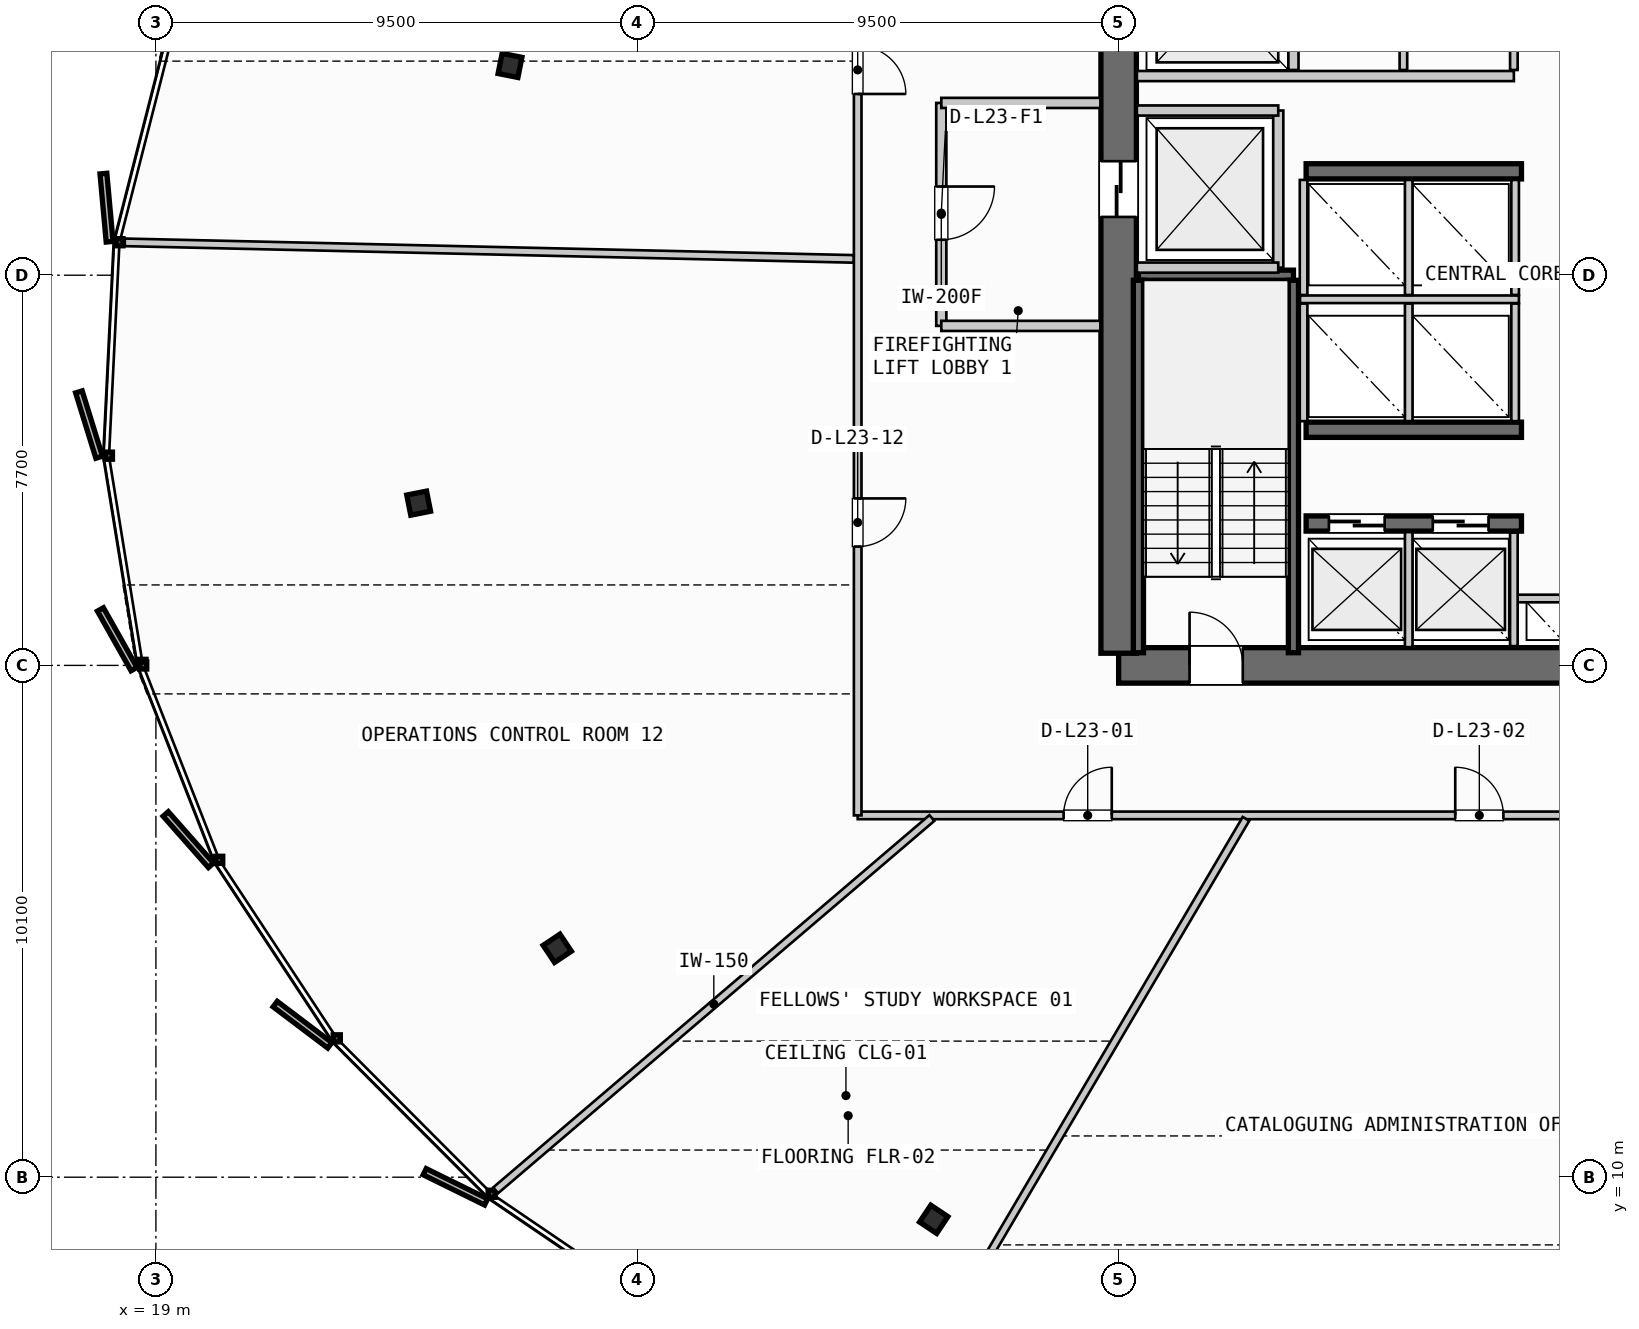
"""IFC4 building model, lengths in metres.
Left out: names, types, materials, properties, quantities, classifications, styles, units other than length and angle.
Written with IfcOpenShell. Run it as: python <this file> out.ifc"""

import sys

from ifc_helpers import new_model, si_unit, direction, frame, frame_2d, origin, origin_2d, place, context, subcontext, project, spatial, rectangle, i_section, extrude, source, transform, mapped, element, fill, save


model = new_model("IFC4")
c1 = context("Model", 3, precision=1e-05, world=origin(), true_north=direction((0.0, 1.0)))
c2 = subcontext(c1, "Body", "Model", "MODEL_VIEW")
j1 = project(units=[si_unit("LENGTHUNIT", "METRE"), si_unit("PLANEANGLEUNIT", "RADIAN")], contexts=[c1])
p1 = place(None, origin())
s1 = spatial("IfcSite", under=j1, at=p1, CompositionType="ELEMENT")
p2 = place(p1, origin())
s2 = spatial("IfcBuilding", under=s1, at=p2, CompositionType="ELEMENT")
p3 = place(p2, frame((0.0, 0.0, 96.4)))
s3 = spatial("IfcBuildingStorey", under=s2, at=p3, CompositionType="ELEMENT", Elevation=96.4)
p4 = place(p3, frame((38.0, 20.1, 0.0), z_axis=(0.0, 0.0, 1.0), x_axis=(1.0, 0.0, 0.0)))
e1 = element("IfcWall", 1, at=p4, inside=s3, PredefinedType="SHEAR", context=c2, shape_type="SweptSolid", body=[
    extrude(rectangle(XDim=17.6, YDim=0.7, at=frame_2d((8.8, 0.0))), origin(), (0.0, 0.0, 1.0), 3.35),
])
p5 = place(p4, frame((1.4, 0.0, 0.0)))
e2 = element("IfcOpeningElement", 2, at=p5, cuts=e1, PredefinedType="OPENING", context=c2, shape_type="SweptSolid", body=[
    extrude(rectangle(XDim=1.05, YDim=2.15, at=frame_2d((0.525, 1.075))), frame((0.0, 0.36, 0.0), z_axis=(0.0, -1.0, 0.0), x_axis=(1.0, 0.0, 0.0)), (0.0, 0.0, 1.0), 0.72),
])
p6 = place(p4, frame((15.15, 0.0, 0.0)))
e3 = element("IfcOpeningElement", 3, at=p6, cuts=e1, PredefinedType="OPENING", context=c2, shape_type="SweptSolid", body=[
    extrude(rectangle(XDim=1.05, YDim=2.15, at=frame_2d((0.525, 1.075))), frame((0.0, 0.36, 0.0), z_axis=(0.0, -1.0, 0.0), x_axis=(1.0, 0.0, 0.0)), (0.0, 0.0, 1.0), 0.72),
])
p7 = place(p3, frame((38.0, 35.26, 0.0), z_axis=(0.0, 0.0, 1.0), x_axis=(0.0, -1.0, 0.0)))
e4 = element("IfcWall", 4, at=p7, inside=s3, PredefinedType="SHEAR", context=c2, shape_type="SweptSolid", body=[
    extrude(rectangle(XDim=14.92, YDim=0.7, at=frame_2d((7.46, 0.0))), origin(), (0.0, 0.0, 1.0), 3.35),
])
p8 = place(p7, frame((5.21, 0.0, 0.0)))
e5 = element("IfcOpeningElement", 5, at=p8, cuts=e4, PredefinedType="OPENING", context=c2, shape_type="SweptSolid", body=[
    extrude(rectangle(XDim=1.1, YDim=2.2, at=frame_2d((0.55, 1.1))), frame((0.0, 0.36, 0.0), z_axis=(0.0, -1.0, 0.0), x_axis=(1.0, 0.0, 0.0)), (0.0, 0.0, 1.0), 0.72),
])
p9 = place(p3, frame((41.7, 22.9, 0.0), z_axis=(0.0, 0.0, 1.0), x_axis=(1.0, 0.0, 0.0)))
e6 = element("IfcWall", 6, at=p9, inside=s3, PredefinedType="SHEAR", context=c2, shape_type="SweptSolid", body=[
    extrude(rectangle(XDim=4.25, YDim=0.3, at=frame_2d((2.125, 0.0))), origin(), (0.0, 0.0, 1.0), 3.35),
])
p10 = place(p9, frame((0.45, 0.0, 0.0)))
e7 = element("IfcOpeningElement", 7, at=p10, cuts=e6, PredefinedType="OPENING", context=c2, shape_type="SweptSolid", body=[
    extrude(rectangle(XDim=1.1, YDim=2.2, at=frame_2d((0.55, 1.1))), frame((0.0, 0.16, 0.0), z_axis=(0.0, -1.0, 0.0), x_axis=(1.0, 0.0, 0.0)), (0.0, 0.0, 1.0), 0.32),
])
p11 = place(p9, frame((2.5, 0.0, 0.0)))
e8 = element("IfcOpeningElement", 8, at=p11, cuts=e6, PredefinedType="OPENING", context=c2, shape_type="SweptSolid", body=[
    extrude(rectangle(XDim=1.1, YDim=2.2, at=frame_2d((0.55, 1.1))), frame((0.0, 0.16, 0.0), z_axis=(0.0, -1.0, 0.0), x_axis=(1.0, 0.0, 0.0)), (0.0, 0.0, 1.0), 0.32),
])
for number, where, z_axis, x_axis in (
    (9, (41.7, 24.75, 0.0), (0.0, 0.0, 1.0), (1.0, 0.0, 0.0)),
    (10, (41.7, 29.85, 0.0), (0.0, 0.0, 1.0), (1.0, 0.0, 0.0)),
):
    element("IfcWall", number, at=place(p3, frame(where, z_axis=z_axis, x_axis=x_axis)), inside=s3, PredefinedType="SHEAR", context=c2, shape_type="SweptSolid", body=[
        extrude(rectangle(XDim=4.25, YDim=0.3, at=frame_2d((2.125, 0.0))), origin(), (0.0, 0.0, 1.0), 3.35),
    ])
m1 = source(origin(), c2, "Body", "SweptSolid", [
    extrude(i_section(OverallWidth=0.405, OverallDepth=0.398, WebThickness=0.035, FlangeThickness=0.056, FilletRadius=0.015, at=origin_2d()), origin(), (0.0, 0.0, 1.0), 3.35),
])
for number, where, z_axis, x_axis in (
    (11, (25.989, 31.94, 0.0), (0.0, 0.0, 1.0), (-0.981, 0.195, 0.0)),
    (12, (24.185, 23.302, 0.0), (0.0, 0.0, 1.0), (-0.981, -0.195, 0.0)),
    (13, (26.921, 14.517, 0.0), (0.0, 0.0, 1.0), (-0.831, -0.556, 0.0)),
    (14, (34.351, 9.168, 0.0), (0.0, 0.0, 1.0), (-0.556, -0.831, 0.0)),
):
    element("IfcColumn", number, at=place(p3, frame(where, z_axis=z_axis, x_axis=x_axis)), inside=s3, PredefinedType="COLUMN", context=c2, shape_type="MappedRepresentation", body=[
        mapped(m1, transform((0.0, 0.0, 0.0), scale=1.0)),
    ])
p12 = place(p3, frame((38.39, 27.8, 0.0), z_axis=(0.0, 0.0, 1.0), x_axis=(1.0, 0.0, 0.0)))
e15 = element("IfcWall", 15, at=p12, inside=s3, PredefinedType="SHEAR", context=c2, shape_type="SweptSolid", body=[
    extrude(rectangle(XDim=3.06, YDim=0.2, at=frame_2d((1.53, 0.0))), origin(), (0.0, 0.0, 1.0), 3.35),
])
for number, where, z_axis, x_axis in (
    (16, (41.45, 27.7, 0.0), (0.0, 0.0, 1.0), (0.0, -1.0, 0.0)),
    (17, (38.39, 20.35, 0.0), (0.0, 0.0, 1.0), (0.0, 1.0, 0.0)),
):
    element("IfcWall", number, at=place(p3, frame(where, z_axis=z_axis, x_axis=x_axis)), inside=s3, PredefinedType="SHEAR", context=c2, shape_type="SweptSolid", body=[
        extrude(rectangle(XDim=7.35, YDim=0.2, at=frame_2d((3.675, 0.0))), origin(), (0.0, 0.0, 1.0), 3.35),
    ])
p13 = place(p3, frame((45.8, 21.42, 0.0), z_axis=(0.0, 0.0, 1.0), x_axis=(1.0, 0.0, 0.0)))
e18 = element("IfcWall", 18, at=p13, inside=s3, PredefinedType="PARTITIONING", context=c2, shape_type="SweptSolid", body=[
    extrude(rectangle(XDim=2.0, YDim=0.15, at=frame_2d((1.0, 0.0))), origin(), (0.0, 0.0, 1.0), 2.28),
])
p14 = place(p3, frame((45.8, 20.48, 0.0), z_axis=(0.0, 0.0, 1.0), x_axis=(0.0, 1.0, 0.0)))
e19 = element("IfcWall", 19, at=p14, inside=s3, PredefinedType="PARTITIONING", context=c2, shape_type="SweptSolid", body=[
    extrude(rectangle(XDim=2.24, YDim=0.15, at=frame_2d((1.12, 0.0))), origin(), (0.0, 0.0, 1.0), 2.28),
])
p15 = place(p3, frame((41.15, 27.95, 0.0), z_axis=(0.0, 0.0, 1.0), x_axis=(0.0, 1.0, 0.0)))
e20 = element("IfcWall", 20, at=p15, inside=s3, PredefinedType="PARTITIONING", context=c2, shape_type="SweptSolid", body=[
    extrude(rectangle(XDim=3.1, YDim=0.2, at=frame_2d((1.55, 0.0))), origin(), (0.0, 0.0, 1.0), 2.28),
])
for number, where, z_axis, x_axis in (
    (21, (38.36, 27.95, 0.0), (0.0, 0.0, 1.0), (1.0, 0.0, 0.0)),
    (22, (38.36, 31.05, 0.0), (0.0, 0.0, 1.0), (1.0, 0.0, 0.0)),
):
    element("IfcWall", number, at=place(p3, frame(where, z_axis=z_axis, x_axis=x_axis)), inside=s3, PredefinedType="PARTITIONING", context=c2, shape_type="SweptSolid", body=[
        extrude(rectangle(XDim=2.79, YDim=0.2, at=frame_2d((1.395, 0.0))), origin(), (0.0, 0.0, 1.0), 2.28),
    ])
p16 = place(p3, frame((34.5, 31.2, 0.0), z_axis=(0.0, 0.0, 1.0), x_axis=(0.0, -1.0, 0.0)))
e23 = element("IfcWall", 23, at=p16, inside=s3, PredefinedType="PARTITIONING", context=c2, shape_type="SweptSolid", body=[
    extrude(rectangle(XDim=4.4, YDim=0.2, at=frame_2d((2.2, 0.0))), origin(), (0.0, 0.0, 1.0), 2.28),
])
p17 = place(p16, frame((1.65, 0.0, 0.0)))
e24 = element("IfcOpeningElement", 24, at=p17, cuts=e23, PredefinedType="OPENING", context=c2, shape_type="SweptSolid", body=[
    extrude(rectangle(XDim=1.05, YDim=2.15, at=frame_2d((0.525, 1.075))), frame((0.0, 0.11, 0.0), z_axis=(0.0, -1.0, 0.0), x_axis=(1.0, 0.0, 0.0)), (0.0, 0.0, 1.0), 0.22),
])
for number, where, z_axis, x_axis in (
    (25, (34.5, 26.8, 0.0), (0.0, 0.0, 1.0), (1.0, 0.0, 0.0)),
    (26, (34.5, 31.2, 0.0), (0.0, 0.0, 1.0), (1.0, 0.0, 0.0)),
):
    element("IfcWall", number, at=place(p3, frame(where, z_axis=z_axis, x_axis=x_axis)), inside=s3, PredefinedType="PARTITIONING", context=c2, shape_type="SweptSolid", body=[
        extrude(rectangle(XDim=3.14, YDim=0.2, at=frame_2d((1.57, 0.0))), origin(), (0.0, 0.0, 1.0), 2.28),
    ])
p18 = place(p3, frame((43.725, 20.46, 0.0), z_axis=(0.0, 0.0, 1.0), x_axis=(0.0, 1.0, 0.0)))
e27 = element("IfcWall", 27, at=p18, inside=s3, PredefinedType="PARTITIONING", context=c2, shape_type="SweptSolid", body=[
    extrude(rectangle(XDim=2.27, YDim=0.15, at=frame_2d((1.135, 0.0))), origin(), (0.0, 0.0, 1.0), 2.28),
])
p19 = place(p3, frame((41.58, 27.325, 0.0), z_axis=(0.0, 0.0, 1.0), x_axis=(1.0, 0.0, 0.0)))
e28 = element("IfcWall", 28, at=p19, inside=s3, PredefinedType="PARTITIONING", context=c2, shape_type="SweptSolid", body=[
    extrude(rectangle(XDim=4.32, YDim=0.15, at=frame_2d((2.16, 0.0))), origin(), (0.0, 0.0, 1.0), 2.28),
])
for number, where, z_axis, x_axis in (
    (29, (41.65, 24.92, 0.0), (0.0, 0.0, 1.0), (0.0, 1.0, 0.0)),
    (30, (43.725, 24.92, 0.0), (0.0, 0.0, 1.0), (0.0, 1.0, 0.0)),
    (31, (45.825, 24.92, 0.0), (0.0, 0.0, 1.0), (0.0, 1.0, 0.0)),
):
    element("IfcWall", number, at=place(p3, frame(where, z_axis=z_axis, x_axis=x_axis)), inside=s3, PredefinedType="PARTITIONING", context=c2, shape_type="SweptSolid", body=[
        extrude(rectangle(XDim=2.32, YDim=0.15, at=frame_2d((1.16, 0.0))), origin(), (0.0, 0.0, 1.0), 2.28),
    ])
for number, where, z_axis, x_axis in (
    (32, (41.65, 27.41, 0.0), (0.0, 0.0, 1.0), (0.0, 1.0, 0.0)),
    (33, (43.725, 27.41, 0.0), (0.0, 0.0, 1.0), (0.0, 1.0, 0.0)),
    (34, (45.825, 27.41, 0.0), (0.0, 0.0, 1.0), (0.0, 1.0, 0.0)),
):
    element("IfcWall", number, at=place(p3, frame(where, z_axis=z_axis, x_axis=x_axis)), inside=s3, PredefinedType="PARTITIONING", context=c2, shape_type="SweptSolid", body=[
        extrude(rectangle(XDim=2.27, YDim=0.15, at=frame_2d((1.135, 0.0))), origin(), (0.0, 0.0, 1.0), 2.28),
    ])
p20 = place(p3, frame((41.45, 31.85, 0.0), z_axis=(0.0, 0.0, 1.0), x_axis=(0.0, 1.0, 0.0)))
e35 = element("IfcWall", 35, at=p20, inside=s3, PredefinedType="PARTITIONING", context=c2, shape_type="SweptSolid", body=[
    extrude(rectangle(XDim=3.29, YDim=0.2, at=frame_2d((1.645, 0.0))), origin(), (0.0, 0.0, 1.0), 2.28),
])
p21 = place(p3, frame((38.36, 31.73, 0.0), z_axis=(0.0, 0.0, 1.0), x_axis=(1.0, 0.0, 0.0)))
e36 = element("IfcWall", 36, at=p21, inside=s3, PredefinedType="PARTITIONING", context=c2, shape_type="SweptSolid", body=[
    extrude(rectangle(XDim=7.44, YDim=0.2, at=frame_2d((3.72, 0.0))), origin(), (0.0, 0.0, 1.0), 2.28),
])
p22 = place(p3, frame((45.8, 31.85, 0.0), z_axis=(0.0, 0.0, 1.0), x_axis=(0.0, 1.0, 0.0)))
e37 = element("IfcWall", 37, at=p22, inside=s3, PredefinedType="PARTITIONING", context=c2, shape_type="SweptSolid", body=[
    extrude(rectangle(XDim=3.29, YDim=0.15, at=frame_2d((1.645, 0.0))), origin(), (0.0, 0.0, 1.0), 2.28),
])
p23 = place(p3, frame((43.62, 31.85, 0.0), z_axis=(0.0, 0.0, 1.0), x_axis=(0.0, 1.0, 0.0)))
e38 = element("IfcWall", 38, at=p23, inside=s3, PredefinedType="PLUMBINGWALL", context=c2, shape_type="SweptSolid", body=[
    extrude(rectangle(XDim=3.29, YDim=0.15, at=frame_2d((1.645, 0.0))), origin(), (0.0, 0.0, 1.0), 2.28),
])
p24 = place(p3, frame((32.85, 17.14, 0.0), z_axis=(0.0, 0.0, 1.0), x_axis=(1.0, 0.0, 0.0)))
e39 = element("IfcWall", 39, at=p24, inside=s3, PredefinedType="PARTITIONING", context=c2, shape_type="SweptSolid", body=[
    extrude(rectangle(XDim=28.42, YDim=0.15, at=frame_2d((14.21, 0.0))), origin(), (0.0, 0.0, 1.0), 2.28),
])
p25 = place(p24, frame((4.064, 0.0, 0.0)))
e40 = element("IfcOpeningElement", 40, at=p25, cuts=e39, PredefinedType="OPENING", context=c2, shape_type="SweptSolid", body=[
    extrude(rectangle(XDim=0.95, YDim=2.15, at=frame_2d((0.475, 1.075))), frame((0.0, 0.085, 0.0), z_axis=(0.0, -1.0, 0.0), x_axis=(1.0, 0.0, 0.0)), (0.0, 0.0, 1.0), 0.17),
])
p26 = place(p24, frame((11.793, 0.0, 0.0)))
e41 = element("IfcOpeningElement", 41, at=p26, cuts=e39, PredefinedType="OPENING", context=c2, shape_type="SweptSolid", body=[
    extrude(rectangle(XDim=0.95, YDim=2.15, at=frame_2d((0.475, 1.075))), frame((0.0, 0.085, 0.0), z_axis=(0.0, -1.0, 0.0), x_axis=(1.0, 0.0, 0.0)), (0.0, 0.0, 1.0), 0.17),
])
p27 = place(p24, frame((21.878, 0.0, 0.0)))
e42 = element("IfcOpeningElement", 42, at=p27, cuts=e39, PredefinedType="OPENING", context=c2, shape_type="SweptSolid", body=[
    extrude(rectangle(XDim=0.95, YDim=2.15, at=frame_2d((0.475, 1.075))), frame((0.0, 0.085, 0.0), z_axis=(0.0, -1.0, 0.0), x_axis=(1.0, 0.0, 0.0)), (0.0, 0.0, 1.0), 0.17),
])
p28 = place(p3, frame((32.85, 37.62, 0.0), z_axis=(0.0, 0.0, 1.0), x_axis=(0.0, -1.0, 0.0)))
e43 = element("IfcWall", 43, at=p28, inside=s3, PredefinedType="PARTITIONING", context=c2, shape_type="SweptSolid", body=[
    extrude(rectangle(XDim=20.48, YDim=0.15, at=frame_2d((10.24, 0.0))), origin(), (0.0, 0.0, 1.0), 2.28),
])
p29 = place(p28, frame((5.293, 0.0, 0.0)))
e44 = element("IfcOpeningElement", 44, at=p29, cuts=e43, PredefinedType="OPENING", context=c2, shape_type="SweptSolid", body=[
    extrude(rectangle(XDim=0.95, YDim=2.15, at=frame_2d((0.475, 1.075))), frame((0.0, 0.085, 0.0), z_axis=(0.0, -1.0, 0.0), x_axis=(1.0, 0.0, 0.0)), (0.0, 0.0, 1.0), 0.17),
])
p30 = place(p28, frame((14.225, 0.0, 0.0)))
e45 = element("IfcOpeningElement", 45, at=p30, cuts=e43, PredefinedType="OPENING", context=c2, shape_type="SweptSolid", body=[
    extrude(rectangle(XDim=0.95, YDim=2.15, at=frame_2d((0.475, 1.075))), frame((0.0, 0.085, 0.0), z_axis=(0.0, -1.0, 0.0), x_axis=(1.0, 0.0, 0.0)), (0.0, 0.0, 1.0), 0.17),
])
p31 = place(p3, frame((34.314, 17.088, 0.0), z_axis=(0.0, 0.0, 1.0), x_axis=(-0.760649717053, -0.649162543549, 0.0)))
e46 = element("IfcWall", 46, at=p31, inside=s3, PredefinedType="PARTITIONING", context=c2, shape_type="SweptSolid", body=[
    extrude(rectangle(XDim=11.317, YDim=0.15, at=frame_2d((5.659, 0.0))), origin(), (0.0, 0.0, 1.0), 2.28),
])
p32 = place(p3, frame((40.513, 17.071, 0.0), z_axis=(0.0, 0.0, 1.0), x_axis=(-0.507501886908, -0.861650645439, 0.0)))
e47 = element("IfcWall", 47, at=p32, inside=s3, PredefinedType="PARTITIONING", context=c2, shape_type="SweptSolid", body=[
    extrude(rectangle(XDim=13.596, YDim=0.15, at=frame_2d((6.798, 0.0))), origin(), (0.0, 0.0, 1.0), 2.28),
])
p33 = place(p3, frame((32.77, 28.122, 0.0), z_axis=(0.0, 0.0, 1.0), x_axis=(-0.999741844305, 0.022721019901, 0.0)))
e48 = element("IfcWall", 48, at=p33, inside=s3, PredefinedType="PARTITIONING", context=c2, shape_type="SweptSolid", body=[
    extrude(rectangle(XDim=14.388, YDim=0.15, at=frame_2d((7.194, 0.0))), origin(), (0.0, 0.0, 1.0), 2.28),
])
m2 = source(origin(), c2, "Body", "SweptSolid", [
    extrude(rectangle(XDim=1.05, YDim=2.15, at=frame_2d((0.525, 1.075))), frame((0.0, 0.025, 0.0), z_axis=(0.0, -1.0, 0.0), x_axis=(1.0, 0.0, 0.0)), (0.0, 0.0, 1.0), 0.05),
])
p34 = place(p5, origin())
e49 = element("IfcDoor", 49, at=p34, inside=s3, OperationType="SINGLE_SWING_LEFT", PredefinedType="DOOR", context=c2, shape_type="MappedRepresentation", body=[
    mapped(m2, transform((0.0, 0.0, 0.0), scale=1.0)),
])
fill(e2, e49)
m3 = source(origin(), c2, "Body", "SweptSolid", [
    extrude(rectangle(XDim=1.1, YDim=2.2, at=frame_2d((0.55, 1.1))), frame((0.0, 0.025, 0.0), z_axis=(0.0, -1.0, 0.0), x_axis=(1.0, 0.0, 0.0)), (0.0, 0.0, 1.0), 0.05),
])
p35 = place(p8, origin())
e50 = element("IfcDoor", 50, at=p35, inside=s3, OperationType="SLIDING_TO_LEFT", PredefinedType="DOOR", context=c2, shape_type="MappedRepresentation", body=[
    mapped(m3, transform((0.0, 0.0, 0.0), scale=1.0)),
])
fill(e5, e50)
p36 = place(p10, origin())
e51 = element("IfcDoor", 51, at=p36, inside=s3, OperationType="SLIDING_TO_LEFT", PredefinedType="DOOR", context=c2, shape_type="MappedRepresentation", body=[
    mapped(m3, transform((0.0, 0.0, 0.0), scale=1.0)),
])
fill(e7, e51)
p37 = place(p11, origin())
e52 = element("IfcDoor", 52, at=p37, inside=s3, OperationType="SLIDING_TO_LEFT", PredefinedType="DOOR", context=c2, shape_type="MappedRepresentation", body=[
    mapped(m3, transform((0.0, 0.0, 0.0), scale=1.0)),
])
fill(e8, e52)
p38 = place(p17, origin())
e53 = element("IfcDoor", 53, at=p38, inside=s3, OperationType="SINGLE_SWING_LEFT", PredefinedType="DOOR", context=c2, shape_type="MappedRepresentation", body=[
    mapped(m2, transform((0.0, 0.0, 0.0), scale=1.0)),
])
fill(e24, e53)
m4 = source(origin(), c2, "Body", "SweptSolid", [
    extrude(rectangle(XDim=0.95, YDim=2.15, at=frame_2d((0.475, 1.075))), frame((0.0, 0.025, 0.0), z_axis=(0.0, -1.0, 0.0), x_axis=(1.0, 0.0, 0.0)), (0.0, 0.0, 1.0), 0.05),
])
p39 = place(p25, origin())
e54 = element("IfcDoor", 54, at=p39, inside=s3, OperationType="SINGLE_SWING_RIGHT", PredefinedType="DOOR", context=c2, shape_type="MappedRepresentation", body=[
    mapped(m4, transform((0.0, 0.0, 0.0), scale=1.0)),
])
fill(e40, e54)
p40 = place(p26, origin())
e55 = element("IfcDoor", 55, at=p40, inside=s3, OperationType="SINGLE_SWING_LEFT", PredefinedType="DOOR", context=c2, shape_type="MappedRepresentation", body=[
    mapped(m4, transform((0.0, 0.0, 0.0), scale=1.0)),
])
fill(e41, e55)
p41 = place(p29, origin())
e56 = element("IfcDoor", 56, at=p41, inside=s3, OperationType="SINGLE_SWING_RIGHT", PredefinedType="DOOR", context=c2, shape_type="MappedRepresentation", body=[
    mapped(m4, transform((0.0, 0.0, 0.0), scale=1.0)),
])
fill(e44, e56)
p42 = place(p30, origin())
e57 = element("IfcDoor", 57, at=p42, inside=s3, OperationType="SINGLE_SWING_LEFT", PredefinedType="DOOR", context=c2, shape_type="MappedRepresentation", body=[
    mapped(m4, transform((0.0, 0.0, 0.0), scale=1.0)),
])
fill(e45, e57)
save(model, sys.argv[1])
